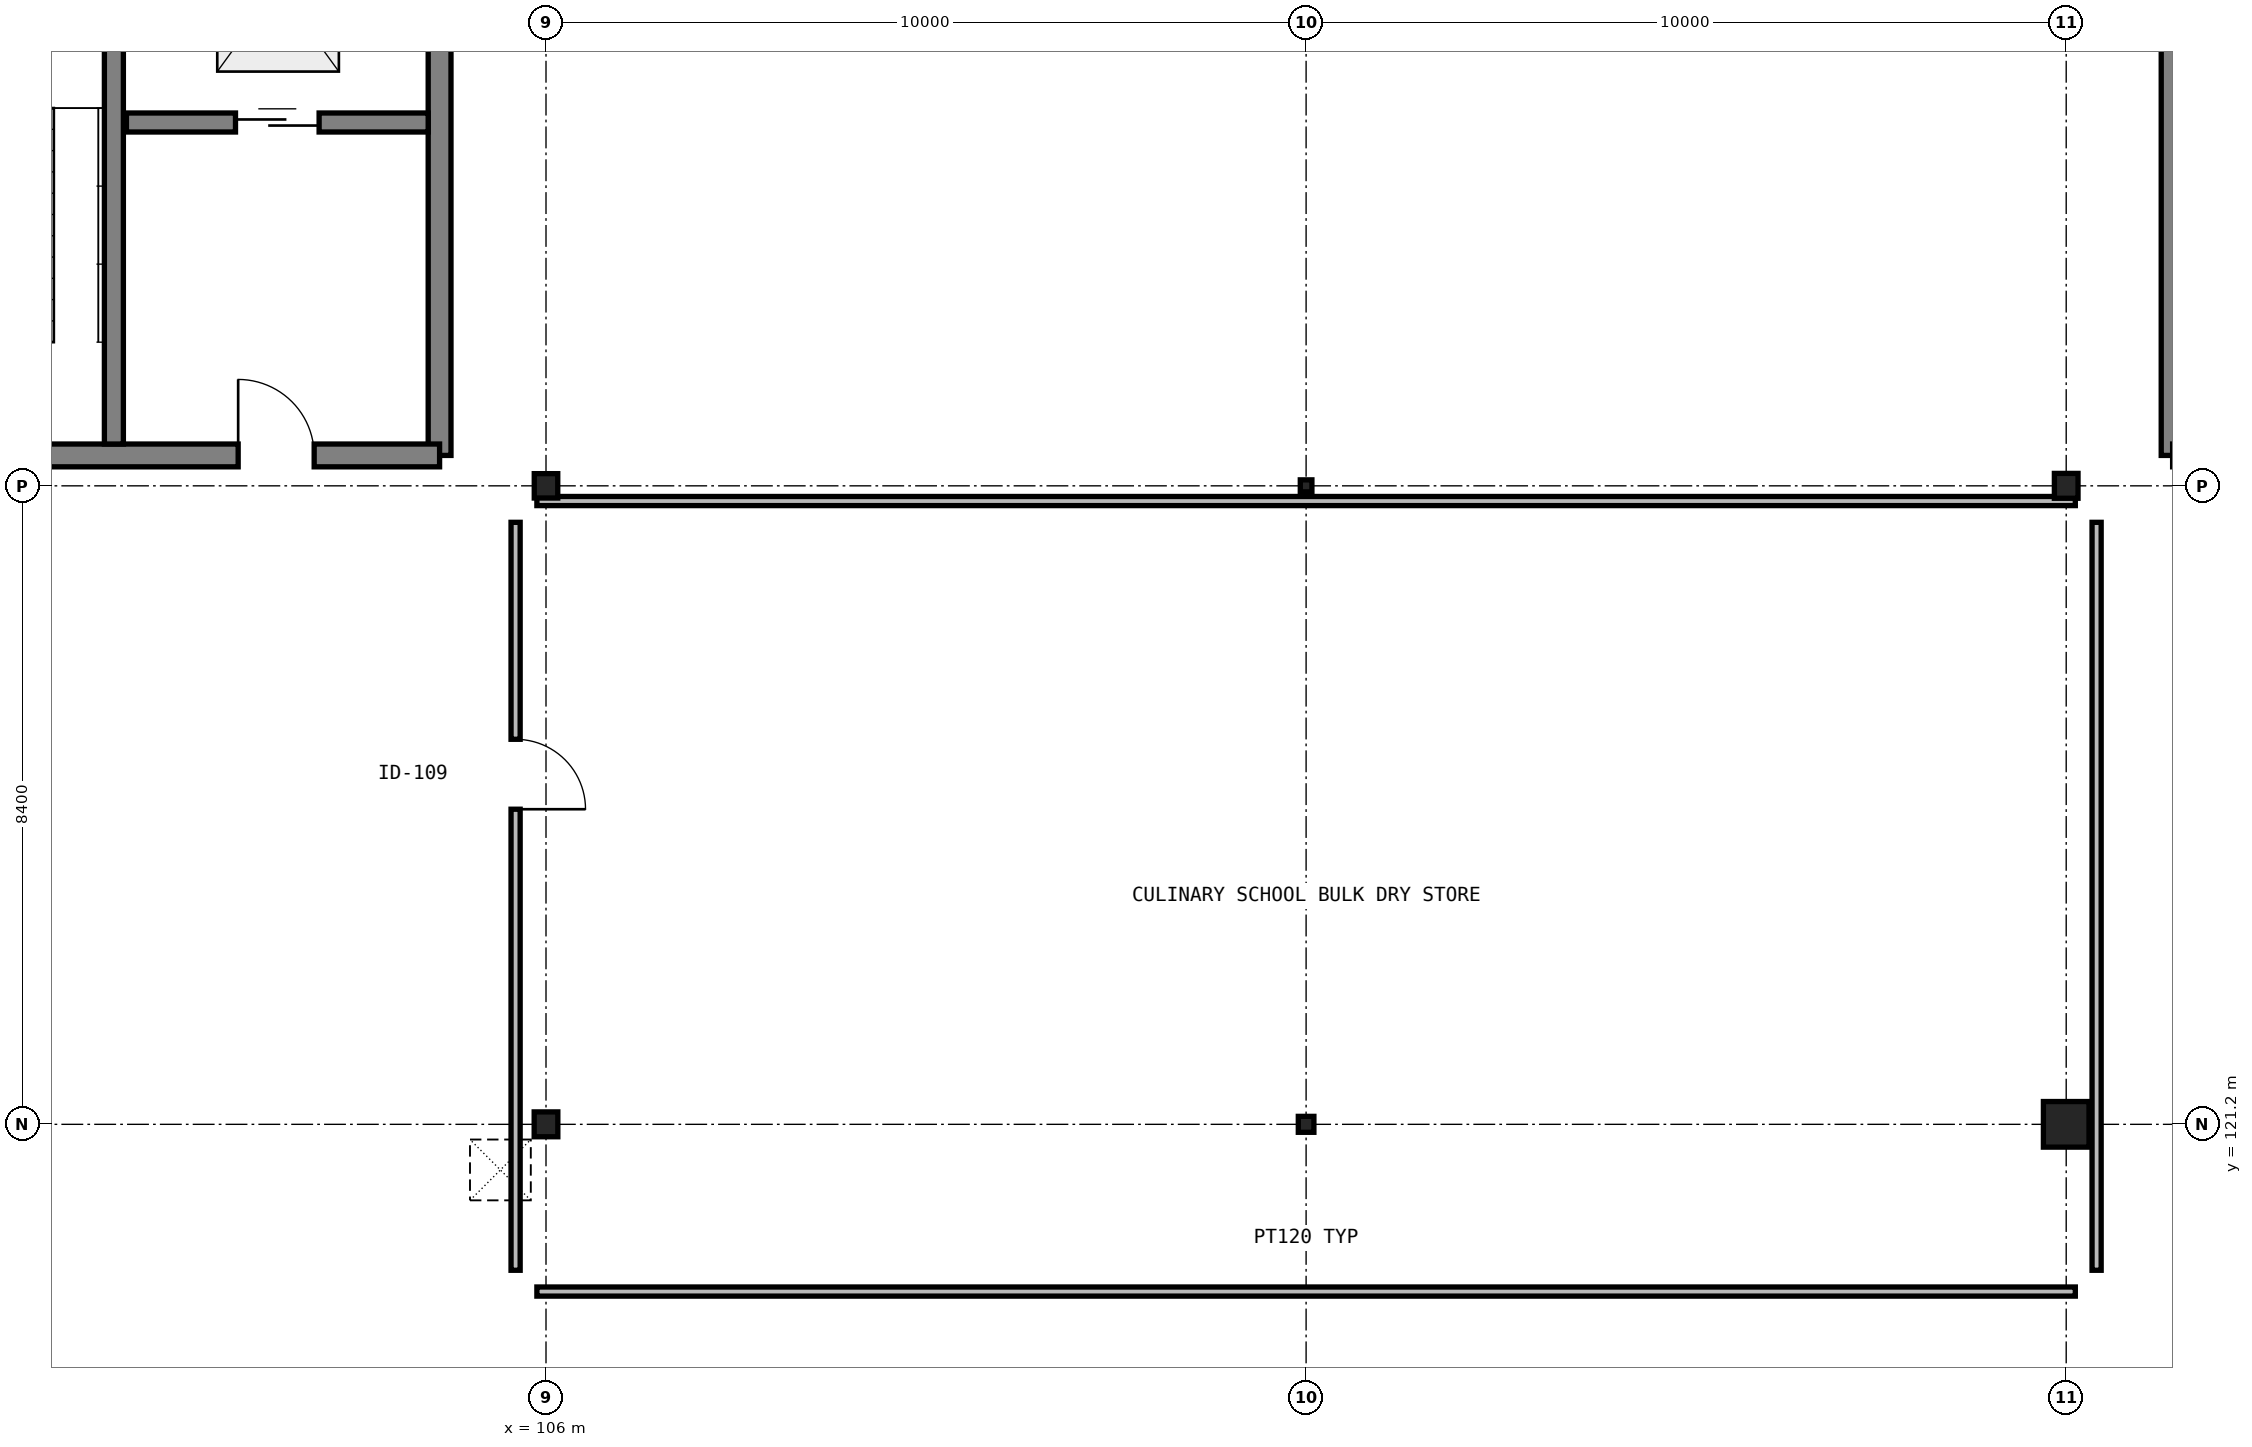
"""IFC4 building model, lengths in metres.
Left out: names, types, materials, properties, quantities, classifications, styles, units other than length and angle.
Written with IfcOpenShell. Run it as: python <this file> out.ifc"""

import sys

from ifc_helpers import new_model, si_unit, direction, frame, frame_2d, origin, origin_2d_with_axis, place, context, subcontext, project, spatial, rectangle, i_section, extrude, element, fill, save


model = new_model("IFC4")
c1 = context("Model", 3, precision=1e-05, world=origin(), true_north=direction((0.0, 1.0)))
c2 = subcontext(c1, "Body", "Model", "MODEL_VIEW")
j1 = project(units=[si_unit("LENGTHUNIT", "METRE"), si_unit("PLANEANGLEUNIT", "RADIAN")], contexts=[c1])
p1 = place(None, origin())
s1 = spatial("IfcSite", under=j1, at=p1, CompositionType="ELEMENT")
p2 = place(p1, origin())
s2 = spatial("IfcBuilding", under=s1, at=p2, CompositionType="ELEMENT")
p3 = place(p2, frame((0.0, 0.0, -4.5)))
s3 = spatial("IfcBuildingStorey", under=s2, at=p3, CompositionType="ELEMENT", Elevation=-4.5)
p4 = place(p3, frame((106.0, 121.2, -0.45), z_axis=(0.0, 0.0, 1.0), x_axis=(1.0, 0.0, 0.0)))
e1 = element("IfcColumn", 1, at=p4, inside=s3, PredefinedType="COLUMN", context=c2, shape_type="SweptSolid", body=[
    extrude(i_section(OverallWidth=0.311, OverallDepth=0.327, WebThickness=0.016, FlangeThickness=0.025, FilletRadius=0.017, at=origin_2d_with_axis()), origin(), (0.0, 0.0, 1.0), 4.95),
])
p5 = place(p3, frame((106.0, 129.6, -0.45), z_axis=(0.0, 0.0, 1.0), x_axis=(1.0, 0.0, 0.0)))
e2 = element("IfcColumn", 2, at=p5, inside=s3, PredefinedType="COLUMN", context=c2, shape_type="SweptSolid", body=[
    extrude(i_section(OverallWidth=0.309, OverallDepth=0.321, WebThickness=0.014, FlangeThickness=0.022, FilletRadius=0.017, at=origin_2d_with_axis()), origin(), (0.0, 0.0, 1.0), 4.95),
])
p6 = place(p3, frame((116.0, 121.2, -0.45), z_axis=(0.0, 0.0, 1.0), x_axis=(1.0, 0.0, 0.0)))
e3 = element("IfcColumn", 3, at=p6, inside=s3, PredefinedType="COLUMN", context=c2, shape_type="SweptSolid", body=[
    extrude(i_section(OverallWidth=0.205, OverallDepth=0.21, WebThickness=0.009, FlangeThickness=0.014, FilletRadius=0.011, at=origin_2d_with_axis()), origin(), (0.0, 0.0, 1.0), 4.95),
])
p7 = place(p3, frame((116.0, 129.6, -0.45), z_axis=(0.0, 0.0, 1.0), x_axis=(1.0, 0.0, 0.0)))
e4 = element("IfcColumn", 4, at=p7, inside=s3, PredefinedType="COLUMN", context=c2, shape_type="SweptSolid", body=[
    extrude(i_section(OverallWidth=0.153, OverallDepth=0.158, WebThickness=0.007, FlangeThickness=0.01, FilletRadius=0.009, at=origin_2d_with_axis()), origin(), (0.0, 0.0, 1.0), 4.95),
])
p8 = place(p3, frame((126.0, 121.2, -0.45), z_axis=(0.0, 0.0, 1.0), x_axis=(1.0, 0.0, 0.0)))
e5 = element("IfcColumn", 5, at=p8, inside=s3, PredefinedType="COLUMN", context=c2, shape_type="SweptSolid", body=[
    extrude(rectangle(XDim=0.6, YDim=0.6, at=origin_2d_with_axis()), origin(), (0.0, 0.0, 1.0), 4.95),
])
p9 = place(p3, frame((126.0, 129.6, -0.45), z_axis=(0.0, 0.0, 1.0), x_axis=(1.0, 0.0, 0.0)))
e6 = element("IfcColumn", 6, at=p9, inside=s3, PredefinedType="COLUMN", context=c2, shape_type="SweptSolid", body=[
    extrude(i_section(OverallWidth=0.311, OverallDepth=0.327, WebThickness=0.016, FlangeThickness=0.025, FilletRadius=0.017, at=origin_2d_with_axis()), origin(), (0.0, 0.0, 1.0), 4.95),
])
p10 = place(p3, frame((104.6, 130.0, 0.0), z_axis=(0.0, 0.0, 1.0), x_axis=(0.0, 1.0, 0.0)))
e7 = element("IfcWall", 7, at=p10, inside=s3, PredefinedType="SHEAR", context=c2, shape_type="SweptSolid", body=[
    extrude(rectangle(XDim=8.0, YDim=0.3, at=frame_2d((4.0, 0.0), x_axis=(1.0, 0.0))), origin(), (0.0, 0.0, 1.0), 4.5),
])
p11 = place(p3, frame((97.2, 130.0, 0.0), z_axis=(0.0, 0.0, 1.0), x_axis=(1.0, 0.0, 0.0)))
e8 = element("IfcWall", 8, at=p11, inside=s3, PredefinedType="SHEAR", context=c2, shape_type="SweptSolid", body=[
    extrude(rectangle(XDim=7.4, YDim=0.3, at=frame_2d((3.7, 0.0), x_axis=(1.0, 0.0))), origin(), (0.0, 0.0, 1.0), 4.5),
])
p12 = place(p11, frame((1.1, 0.0, 0.0)))
e9 = element("IfcOpeningElement", 9, at=p12, cuts=e8, PredefinedType="OPENING", context=c2, shape_type="SweptSolid", body=[
    extrude(rectangle(XDim=1.0, YDim=2.15, at=frame_2d((0.5, 1.075), x_axis=(1.0, 0.0))), frame((0.0, 0.16, 0.0), z_axis=(0.0, -1.0, 0.0), x_axis=(1.0, 0.0, 0.0)), (0.0, 0.0, 1.0), 0.32),
])
p13 = place(p11, frame((4.75, 0.0, 0.0)))
e10 = element("IfcOpeningElement", 10, at=p13, cuts=e8, PredefinedType="OPENING", context=c2, shape_type="SweptSolid", body=[
    extrude(rectangle(XDim=1.0, YDim=2.15, at=frame_2d((0.5, 1.075), x_axis=(1.0, 0.0))), frame((0.0, 0.16, 0.0), z_axis=(0.0, -1.0, 0.0), x_axis=(1.0, 0.0, 0.0)), (0.0, 0.0, 1.0), 0.32),
])
p14 = place(p3, frame((100.315, 130.15, 0.0), z_axis=(0.0, 0.0, 1.0), x_axis=(0.0, 1.0, 0.0)))
e11 = element("IfcWall", 11, at=p14, inside=s3, PredefinedType="SHEAR", context=c2, shape_type="SweptSolid", body=[
    extrude(rectangle(XDim=7.7, YDim=0.25, at=frame_2d((3.85, 0.0), x_axis=(1.0, 0.0))), origin(), (0.0, 0.0, 1.0), 4.5),
])
p15 = place(p3, frame((100.48, 134.38, 0.0), z_axis=(0.0, 0.0, 1.0), x_axis=(1.0, 0.0, 0.0)))
e12 = element("IfcWall", 12, at=p15, inside=s3, PredefinedType="SHEAR", context=c2, shape_type="SweptSolid", body=[
    extrude(rectangle(XDim=3.97, YDim=0.25, at=frame_2d((1.985, 0.0), x_axis=(1.0, 0.0))), origin(), (0.0, 0.0, 1.0), 4.2),
])
p16 = place(p15, frame((1.435, 0.0, 0.0)))
e13 = element("IfcOpeningElement", 13, at=p16, cuts=e12, PredefinedType="OPENING", context=c2, shape_type="SweptSolid", body=[
    extrude(rectangle(XDim=1.1, YDim=2.15, at=frame_2d((0.55, 1.075), x_axis=(1.0, 0.0))), frame((0.0, 0.135, 0.0), z_axis=(0.0, -1.0, 0.0), x_axis=(1.0, 0.0, 0.0)), (0.0, 0.0, 1.0), 0.27),
])
p17 = place(p3, frame((127.4, 138.0, 0.0), z_axis=(0.0, 0.0, 1.0), x_axis=(0.0, -1.0, 0.0)))
e14 = element("IfcWall", 14, at=p17, inside=s3, PredefinedType="SHEAR", context=c2, shape_type="SweptSolid", body=[
    extrude(rectangle(XDim=8.0, YDim=0.3, at=frame_2d((4.0, 0.0), x_axis=(1.0, 0.0))), origin(), (0.0, 0.0, 1.0), 4.5),
])
p18 = place(p3, frame((105.88, 119.0, 0.0), z_axis=(0.0, 0.0, 1.0), x_axis=(1.0, 0.0, 0.0)))
e15 = element("IfcWall", 15, at=p18, inside=s3, PredefinedType="PARTITIONING", context=c2, shape_type="SweptSolid", body=[
    extrude(rectangle(XDim=20.24, YDim=0.12, at=frame_2d((10.12, 0.0), x_axis=(1.0, 0.0))), origin(), (0.0, 0.0, 1.0), 3.58),
])
p19 = place(p3, frame((126.4, 119.28, 0.0), z_axis=(0.0, 0.0, 1.0), x_axis=(0.0, 1.0, 0.0)))
e16 = element("IfcWall", 16, at=p19, inside=s3, PredefinedType="PARTITIONING", context=c2, shape_type="SweptSolid", body=[
    extrude(rectangle(XDim=9.84, YDim=0.12, at=frame_2d((4.92, 0.0), x_axis=(1.0, 0.0))), origin(), (0.0, 0.0, 1.0), 3.58),
])
p20 = place(p3, frame((126.12, 129.4, 0.0), z_axis=(0.0, 0.0, 1.0), x_axis=(-1.0, 0.0, 0.0)))
e17 = element("IfcWall", 17, at=p20, inside=s3, PredefinedType="PARTITIONING", context=c2, shape_type="SweptSolid", body=[
    extrude(rectangle(XDim=20.24, YDim=0.12, at=frame_2d((10.12, 0.0), x_axis=(1.0, 0.0))), origin(), (0.0, 0.0, 1.0), 3.58),
])
p21 = place(p3, frame((105.6, 129.12, 0.0), z_axis=(0.0, 0.0, 1.0), x_axis=(0.0, -1.0, 0.0)))
e18 = element("IfcWall", 18, at=p21, inside=s3, PredefinedType="PARTITIONING", context=c2, shape_type="SweptSolid", body=[
    extrude(rectangle(XDim=9.84, YDim=0.12, at=frame_2d((4.92, 0.0), x_axis=(1.0, 0.0))), origin(), (0.0, 0.0, 1.0), 3.58),
])
p22 = place(p21, frame((2.854, 0.0, 0.0)))
e19 = element("IfcOpeningElement", 19, at=p22, cuts=e18, PredefinedType="OPENING", context=c2, shape_type="SweptSolid", body=[
    extrude(rectangle(XDim=0.92, YDim=2.15, at=frame_2d((0.46, 1.075), x_axis=(1.0, 0.0))), frame((0.0, 0.07, 0.0), z_axis=(0.0, -1.0, 0.0), x_axis=(1.0, 0.0, 0.0)), (0.0, 0.0, 1.0), 0.14),
])
p23 = place(p13, origin())
e20 = element("IfcDoor", 20, at=p23, inside=s3, OperationType="SINGLE_SWING_LEFT", PredefinedType="DOOR", context=c2, shape_type="SweptSolid", body=[
    extrude(rectangle(XDim=1.0, YDim=2.15, at=frame_2d((0.5, 1.075), x_axis=(1.0, 0.0))), frame((0.0, 0.025, 0.0), z_axis=(0.0, -1.0, 0.0), x_axis=(1.0, 0.0, 0.0)), (0.0, 0.0, 1.0), 0.05),
])
fill(e10, e20)
p24 = place(p16, origin())
e21 = element("IfcDoor", 21, at=p24, inside=s3, OperationType="SLIDING_TO_LEFT", PredefinedType="DOOR", context=c2, shape_type="SweptSolid", body=[
    extrude(rectangle(XDim=1.1, YDim=2.15, at=frame_2d((0.55, 1.075), x_axis=(1.0, 0.0))), frame((0.0, 0.025, 0.0), z_axis=(0.0, -1.0, 0.0), x_axis=(1.0, 0.0, 0.0)), (0.0, 0.0, 1.0), 0.05),
])
fill(e13, e21)
p25 = place(p22, origin())
e22 = element("IfcDoor", 22, at=p25, inside=s3, OperationType="SINGLE_SWING_RIGHT", PredefinedType="DOOR", context=c2, shape_type="SweptSolid", body=[
    extrude(rectangle(XDim=0.92, YDim=2.15, at=frame_2d((0.46, 1.075), x_axis=(1.0, 0.0))), frame((0.0, 0.025, 0.0), z_axis=(0.0, -1.0, 0.0), x_axis=(1.0, 0.0, 0.0)), (0.0, 0.0, 1.0), 0.05),
])
fill(e19, e22)
save(model, sys.argv[1])
